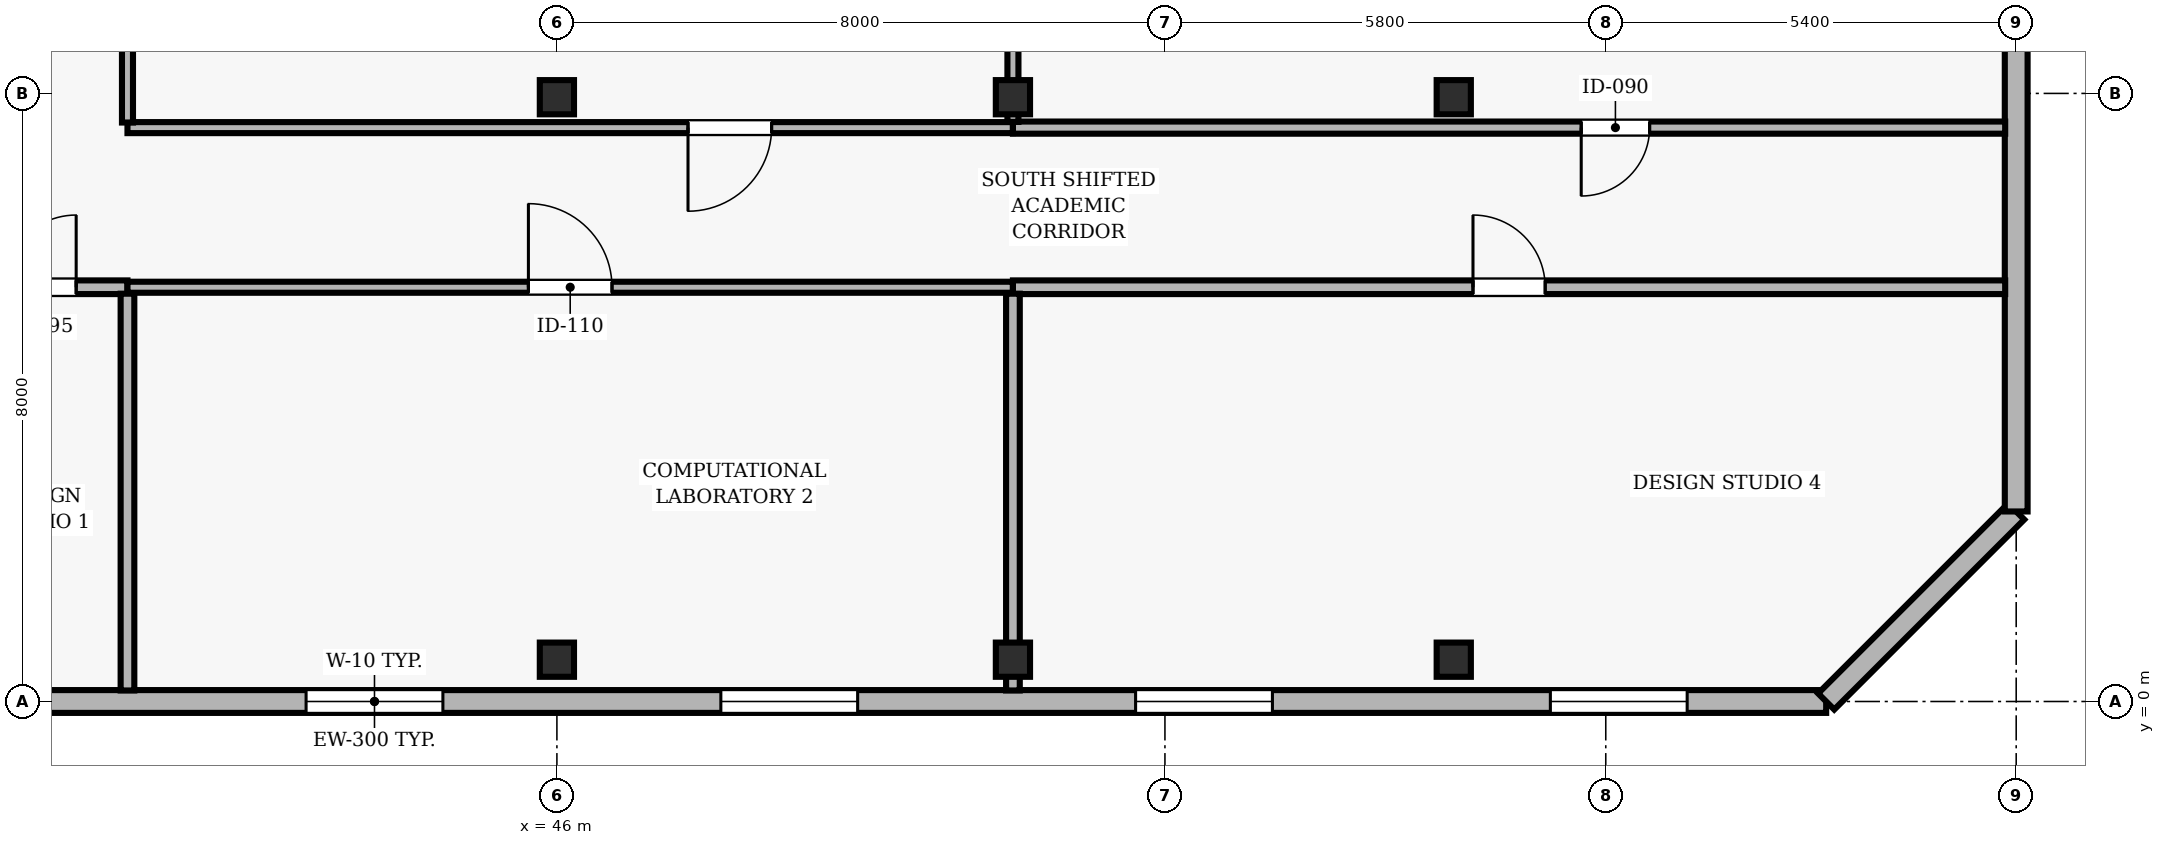
"""IFC4 building model, lengths in metres.
Left out: names, types, materials, properties, quantities, classifications, styles, units other than length and angle.
Written with IfcOpenShell. Run it as: python <this file> out.ifc"""

import sys

from ifc_helpers import new_model, si_unit, direction, frame, frame_2d, origin, origin_2d, place, context, subcontext, project, spatial, rectangle, hollow_rectangle, extrude, element, fill, save


model = new_model("IFC4")
c1 = context("Model", 3, precision=1e-05, world=origin(), true_north=direction((0.0, 1.0)))
c2 = subcontext(c1, "Body", "Model", "MODEL_VIEW")
j1 = project(units=[si_unit("LENGTHUNIT", "METRE"), si_unit("PLANEANGLEUNIT", "RADIAN")], contexts=[c1])
p1 = place(None, origin())
s1 = spatial("IfcSite", under=j1, at=p1, CompositionType="ELEMENT")
p2 = place(p1, origin())
s2 = spatial("IfcBuilding", under=s1, at=p2, CompositionType="ELEMENT")
p3 = place(p2, frame((0.0, 0.0, 187.5)))
s3 = spatial("IfcBuildingStorey", under=s2, at=p3, CompositionType="ELEMENT", Elevation=187.5)
for number, where, z_axis, x_axis in (
    (1, (46.0, 0.55, 0.0), (0.0, 0.0, 1.0), (1.0, 0.0, 0.0)),
    (2, (46.0, 7.95, 0.0), (0.0, 0.0, 1.0), (1.0, 0.0, 0.0)),
    (3, (52.0, 0.55, 0.0), (0.0, 0.0, 1.0), (1.0, 0.0, 0.0)),
    (4, (52.0, 7.95, 0.0), (0.0, 0.0, 1.0), (1.0, 0.0, 0.0)),
    (5, (57.8, 0.55, 0.0), (0.0, 0.0, 1.0), (1.0, 0.0, 0.0)),
    (6, (57.8, 7.95, 0.0), (0.0, 0.0, 1.0), (1.0, 0.0, 0.0)),
):
    element("IfcColumn", number, at=place(p3, frame(where, z_axis=z_axis, x_axis=x_axis)), inside=s3, PredefinedType="COLUMN", context=c2, shape_type="SweptSolid", body=[
        extrude(hollow_rectangle(XDim=0.45, YDim=0.45, WallThickness=0.02, at=origin_2d()), origin(), (0.0, 0.0, 1.0), 3.9),
    ])
p4 = place(p3, frame((24.5, 0.0, 0.0), z_axis=(0.0, 0.0, 1.0), x_axis=(1.0, 0.0, 0.0)))
e7 = element("IfcWall", 7, at=p4, inside=s3, PredefinedType="SOLIDWALL", context=c2, shape_type="SweptSolid", body=[
    extrude(rectangle(XDim=38.2, YDim=0.3, at=frame_2d((19.1, 0.0))), origin(), (0.0, 0.0, 1.0), 3.69),
])
p5 = place(p4, frame((1.829, 0.0, 0.9)))
e8 = element("IfcOpeningElement", 8, at=p5, cuts=e7, PredefinedType="OPENING", context=c2, shape_type="SweptSolid", body=[
    extrude(rectangle(XDim=1.8, YDim=2.2, at=frame_2d((0.9, 1.1))), frame((0.0, 0.16, 0.0), z_axis=(0.0, -1.0, 0.0), x_axis=(1.0, 0.0, 0.0)), (0.0, 0.0, 1.0), 0.32),
])
p6 = place(p4, frame((8.186, 0.0, 0.9)))
e9 = element("IfcOpeningElement", 9, at=p6, cuts=e7, PredefinedType="OPENING", context=c2, shape_type="SweptSolid", body=[
    extrude(rectangle(XDim=1.8, YDim=2.2, at=frame_2d((0.9, 1.1))), frame((0.0, 0.16, 0.0), z_axis=(0.0, -1.0, 0.0), x_axis=(1.0, 0.0, 0.0)), (0.0, 0.0, 1.0), 0.32),
])
p7 = place(p4, frame((18.2, 0.0, 0.9)))
e10 = element("IfcOpeningElement", 10, at=p7, cuts=e7, PredefinedType="OPENING", context=c2, shape_type="SweptSolid", body=[
    extrude(rectangle(XDim=1.8, YDim=2.2, at=frame_2d((0.9, 1.1))), frame((0.0, 0.16, 0.0), z_axis=(0.0, -1.0, 0.0), x_axis=(1.0, 0.0, 0.0)), (0.0, 0.0, 1.0), 0.32),
])
p8 = place(p4, frame((23.657, 0.0, 0.9)))
e11 = element("IfcOpeningElement", 11, at=p8, cuts=e7, PredefinedType="OPENING", context=c2, shape_type="SweptSolid", body=[
    extrude(rectangle(XDim=1.8, YDim=2.2, at=frame_2d((0.9, 1.1))), frame((0.0, 0.16, 0.0), z_axis=(0.0, -1.0, 0.0), x_axis=(1.0, 0.0, 0.0)), (0.0, 0.0, 1.0), 0.32),
])
p9 = place(p4, frame((29.114, 0.0, 0.9)))
e12 = element("IfcOpeningElement", 12, at=p9, cuts=e7, PredefinedType="OPENING", context=c2, shape_type="SweptSolid", body=[
    extrude(rectangle(XDim=1.8, YDim=2.2, at=frame_2d((0.9, 1.1))), frame((0.0, 0.16, 0.0), z_axis=(0.0, -1.0, 0.0), x_axis=(1.0, 0.0, 0.0)), (0.0, 0.0, 1.0), 0.32),
])
p10 = place(p4, frame((34.571, 0.0, 0.9)))
e13 = element("IfcOpeningElement", 13, at=p10, cuts=e7, PredefinedType="OPENING", context=c2, shape_type="SweptSolid", body=[
    extrude(rectangle(XDim=1.8, YDim=2.2, at=frame_2d((0.9, 1.1))), frame((0.0, 0.16, 0.0), z_axis=(0.0, -1.0, 0.0), x_axis=(1.0, 0.0, 0.0)), (0.0, 0.0, 1.0), 0.32),
])
p11 = place(p3, frame((62.7, 0.0, 0.0), z_axis=(0.0, 0.0, 1.0), x_axis=(0.707106781187, 0.707106781187, 0.0)))
e14 = element("IfcWall", 14, at=p11, inside=s3, PredefinedType="SOLIDWALL", context=c2, shape_type="SweptSolid", body=[
    extrude(rectangle(XDim=3.536, YDim=0.3, at=frame_2d((1.768, 0.0))), origin(), (0.0, 0.0, 1.0), 3.69),
])
p12 = place(p3, frame((65.2, 2.5, 0.0), z_axis=(0.0, 0.0, 1.0), x_axis=(0.0, 1.0, 0.0)))
e15 = element("IfcWall", 15, at=p12, inside=s3, PredefinedType="SOLIDWALL", context=c2, shape_type="SweptSolid", body=[
    extrude(rectangle(XDim=11.0, YDim=0.3, at=frame_2d((5.5, 0.0))), origin(), (0.0, 0.0, 1.0), 3.69),
])
p13 = place(p12, frame((6.75, 0.0, 0.9)))
e16 = element("IfcOpeningElement", 16, at=p13, cuts=e15, PredefinedType="OPENING", context=c2, shape_type="SweptSolid", body=[
    extrude(rectangle(XDim=3.0, YDim=2.2, at=frame_2d((1.5, 1.1))), frame((0.0, 0.16, 0.0), z_axis=(0.0, -1.0, 0.0), x_axis=(1.0, 0.0, 0.0)), (0.0, 0.0, 1.0), 0.32),
])
p14 = place(p3, frame((38.05, 5.45, 0.0), z_axis=(0.0, 0.0, 1.0), x_axis=(1.0, 0.0, 0.0)))
e17 = element("IfcWall", 17, at=p14, inside=s3, PredefinedType="PARTITIONING", context=c2, shape_type="SweptSolid", body=[
    extrude(rectangle(XDim=2.3, YDim=0.18, at=frame_2d((1.15, 0.0))), origin(), (0.0, 0.0, 1.0), 3.372),
])
p15 = place(p14, frame((0.675, 0.0, 0.0)))
e18 = element("IfcOpeningElement", 18, at=p15, cuts=e17, PredefinedType="OPENING", context=c2, shape_type="SweptSolid", body=[
    extrude(rectangle(XDim=0.95, YDim=2.1, at=frame_2d((0.475, 1.05))), frame((0.0, 0.1, 0.0), z_axis=(0.0, -1.0, 0.0), x_axis=(1.0, 0.0, 0.0)), (0.0, 0.0, 1.0), 0.2),
])
p16 = place(p3, frame((40.35, 5.45, 0.0), z_axis=(0.0, 0.0, 1.0), x_axis=(1.0, 0.0, 0.0)))
e19 = element("IfcWall", 19, at=p16, inside=s3, PredefinedType="PARTITIONING", context=c2, shape_type="SweptSolid", body=[
    extrude(rectangle(XDim=11.65, YDim=0.145, at=frame_2d((5.825, 0.0))), origin(), (0.0, 0.0, 1.0), 3.372),
])
p17 = place(p16, frame((5.275, 0.0, 0.0)))
e20 = element("IfcOpeningElement", 20, at=p17, cuts=e19, PredefinedType="OPENING", context=c2, shape_type="SweptSolid", body=[
    extrude(rectangle(XDim=1.1, YDim=2.15, at=frame_2d((0.55, 1.075))), frame((0.0, 0.083, 0.0), z_axis=(0.0, -1.0, 0.0), x_axis=(1.0, 0.0, 0.0)), (0.0, 0.0, 1.0), 0.165),
])
p18 = place(p3, frame((52.0, 5.45, 0.0), z_axis=(0.0, 0.0, 1.0), x_axis=(1.0, 0.0, 0.0)))
e21 = element("IfcWall", 21, at=p18, inside=s3, PredefinedType="PARTITIONING", context=c2, shape_type="SweptSolid", body=[
    extrude(rectangle(XDim=13.055, YDim=0.18, at=frame_2d((6.527, 0.0))), origin(), (0.0, 0.0, 1.0), 3.372),
])
p19 = place(p18, frame((6.053, 0.0, 0.0)))
e22 = element("IfcOpeningElement", 22, at=p19, cuts=e21, PredefinedType="OPENING", context=c2, shape_type="SweptSolid", body=[
    extrude(rectangle(XDim=0.95, YDim=2.1, at=frame_2d((0.475, 1.05))), frame((0.0, 0.1, 0.0), z_axis=(0.0, -1.0, 0.0), x_axis=(1.0, 0.0, 0.0)), (0.0, 0.0, 1.0), 0.2),
])
p20 = place(p3, frame((52.0, 7.55, 0.0), z_axis=(0.0, 0.0, 1.0), x_axis=(-1.0, 0.0, 0.0)))
e23 = element("IfcWall", 23, at=p20, inside=s3, PredefinedType="PARTITIONING", context=c2, shape_type="SweptSolid", body=[
    extrude(rectangle(XDim=11.65, YDim=0.145, at=frame_2d((5.825, 0.0))), origin(), (0.0, 0.0, 1.0), 3.146),
])
p21 = place(p20, frame((3.175, 0.0, 0.0)))
e24 = element("IfcOpeningElement", 24, at=p21, cuts=e23, PredefinedType="OPENING", context=c2, shape_type="SweptSolid", body=[
    extrude(rectangle(XDim=1.1, YDim=2.15, at=frame_2d((0.55, 1.075))), frame((0.0, 0.083, 0.0), z_axis=(0.0, -1.0, 0.0), x_axis=(1.0, 0.0, 0.0)), (0.0, 0.0, 1.0), 0.165),
])
p22 = place(p3, frame((65.055, 7.55, 0.0), z_axis=(0.0, 0.0, 1.0), x_axis=(-1.0, 0.0, 0.0)))
e25 = element("IfcWall", 25, at=p22, inside=s3, PredefinedType="PARTITIONING", context=c2, shape_type="SweptSolid", body=[
    extrude(rectangle(XDim=13.055, YDim=0.16, at=frame_2d((6.527, 0.0))), origin(), (0.0, 0.0, 1.0), 3.146),
])
p23 = place(p22, frame((4.678, 0.0, 0.0)))
e26 = element("IfcOpeningElement", 26, at=p23, cuts=e25, PredefinedType="OPENING", context=c2, shape_type="SweptSolid", body=[
    extrude(rectangle(XDim=0.9, YDim=2.1, at=frame_2d((0.45, 1.05))), frame((0.0, 0.09, 0.0), z_axis=(0.0, -1.0, 0.0), x_axis=(1.0, 0.0, 0.0)), (0.0, 0.0, 1.0), 0.18),
])
p24 = place(p3, frame((40.35, 0.145, 0.0), z_axis=(0.0, 0.0, 1.0), x_axis=(0.0, 1.0, 0.0)))
e27 = element("IfcWall", 27, at=p24, inside=s3, PredefinedType="PARTITIONING", context=c2, shape_type="SweptSolid", body=[
    extrude(rectangle(XDim=5.22, YDim=0.18, at=frame_2d((2.61, 0.0))), origin(), (0.0, 0.0, 1.0), 3.69),
])
p25 = place(p3, frame((40.35, 7.617, 0.0), z_axis=(0.0, 0.0, 1.0), x_axis=(0.0, 1.0, 0.0)))
e28 = element("IfcWall", 28, at=p25, inside=s3, PredefinedType="PARTITIONING", context=c2, shape_type="SweptSolid", body=[
    extrude(rectangle(XDim=8.308, YDim=0.145, at=frame_2d((4.154, 0.0))), origin(), (0.0, 0.0, 1.0), 3.372),
])
p26 = place(p3, frame((52.0, 0.145, 0.0), z_axis=(0.0, 0.0, 1.0), x_axis=(0.0, 1.0, 0.0)))
e29 = element("IfcWall", 29, at=p26, inside=s3, PredefinedType="PARTITIONING", context=c2, shape_type="SweptSolid", body=[
    extrude(rectangle(XDim=5.22, YDim=0.18, at=frame_2d((2.61, 0.0))), origin(), (0.0, 0.0, 1.0), 3.146),
])
p27 = place(p3, frame((52.0, 7.625, 0.0), z_axis=(0.0, 0.0, 1.0), x_axis=(0.0, 1.0, 0.0)))
e30 = element("IfcWall", 30, at=p27, inside=s3, PredefinedType="PARTITIONING", context=c2, shape_type="SweptSolid", body=[
    extrude(rectangle(XDim=8.23, YDim=0.145, at=frame_2d((4.115, 0.0))), origin(), (0.0, 0.0, 1.0), 3.146),
])
p28 = place(p7, origin())
e31 = element("IfcWindow", 31, at=p28, inside=s3, PartitioningType="SINGLE_PANEL", PredefinedType="WINDOW", context=c2, shape_type="SweptSolid", body=[
    extrude(rectangle(XDim=1.8, YDim=2.2, at=frame_2d((0.9, 1.1))), frame((0.0, 0.03, 0.0), z_axis=(0.0, -1.0, 0.0), x_axis=(1.0, 0.0, 0.0)), (0.0, 0.0, 1.0), 0.06),
])
fill(e10, e31)
p29 = place(p8, origin())
e32 = element("IfcWindow", 32, at=p29, inside=s3, PartitioningType="SINGLE_PANEL", PredefinedType="WINDOW", context=c2, shape_type="SweptSolid", body=[
    extrude(rectangle(XDim=1.8, YDim=2.2, at=frame_2d((0.9, 1.1))), frame((0.0, 0.03, 0.0), z_axis=(0.0, -1.0, 0.0), x_axis=(1.0, 0.0, 0.0)), (0.0, 0.0, 1.0), 0.06),
])
fill(e11, e32)
p30 = place(p9, origin())
e33 = element("IfcWindow", 33, at=p30, inside=s3, PartitioningType="SINGLE_PANEL", PredefinedType="WINDOW", context=c2, shape_type="SweptSolid", body=[
    extrude(rectangle(XDim=1.8, YDim=2.2, at=frame_2d((0.9, 1.1))), frame((0.0, 0.03, 0.0), z_axis=(0.0, -1.0, 0.0), x_axis=(1.0, 0.0, 0.0)), (0.0, 0.0, 1.0), 0.06),
])
fill(e12, e33)
p31 = place(p10, origin())
e34 = element("IfcWindow", 34, at=p31, inside=s3, PartitioningType="SINGLE_PANEL", PredefinedType="WINDOW", context=c2, shape_type="SweptSolid", body=[
    extrude(rectangle(XDim=1.8, YDim=2.2, at=frame_2d((0.9, 1.1))), frame((0.0, 0.03, 0.0), z_axis=(0.0, -1.0, 0.0), x_axis=(1.0, 0.0, 0.0)), (0.0, 0.0, 1.0), 0.06),
])
fill(e13, e34)
p32 = place(p15, origin())
e35 = element("IfcDoor", 35, at=p32, inside=s3, OperationType="SINGLE_SWING_RIGHT", PredefinedType="DOOR", context=c2, shape_type="SweptSolid", body=[
    extrude(rectangle(XDim=0.95, YDim=2.1, at=frame_2d((0.475, 1.05))), frame((0.0, 0.025, 0.0), z_axis=(0.0, -1.0, 0.0), x_axis=(1.0, 0.0, 0.0)), (0.0, 0.0, 1.0), 0.05),
])
fill(e18, e35)
p33 = place(p17, origin())
e36 = element("IfcDoor", 36, at=p33, inside=s3, OperationType="SINGLE_SWING_LEFT", PredefinedType="DOOR", context=c2, shape_type="SweptSolid", body=[
    extrude(rectangle(XDim=1.1, YDim=2.15, at=frame_2d((0.55, 1.075))), frame((0.0, 0.025, 0.0), z_axis=(0.0, -1.0, 0.0), x_axis=(1.0, 0.0, 0.0)), (0.0, 0.0, 1.0), 0.05),
])
fill(e20, e36)
p34 = place(p21, origin())
e37 = element("IfcDoor", 37, at=p34, inside=s3, OperationType="SINGLE_SWING_RIGHT", PredefinedType="DOOR", context=c2, shape_type="SweptSolid", body=[
    extrude(rectangle(XDim=1.1, YDim=2.15, at=frame_2d((0.55, 1.075))), frame((0.0, 0.025, 0.0), z_axis=(0.0, -1.0, 0.0), x_axis=(1.0, 0.0, 0.0)), (0.0, 0.0, 1.0), 0.05),
])
fill(e24, e37)
p35 = place(p19, origin())
e38 = element("IfcDoor", 38, at=p35, inside=s3, OperationType="SINGLE_SWING_LEFT", PredefinedType="DOOR", context=c2, shape_type="SweptSolid", body=[
    extrude(rectangle(XDim=0.95, YDim=2.1, at=frame_2d((0.475, 1.05))), frame((0.0, 0.025, 0.0), z_axis=(0.0, -1.0, 0.0), x_axis=(1.0, 0.0, 0.0)), (0.0, 0.0, 1.0), 0.05),
])
fill(e22, e38)
p36 = place(p23, origin())
e39 = element("IfcDoor", 39, at=p36, inside=s3, OperationType="SINGLE_SWING_RIGHT", PredefinedType="DOOR", context=c2, shape_type="SweptSolid", body=[
    extrude(rectangle(XDim=0.9, YDim=2.1, at=frame_2d((0.45, 1.05))), frame((0.0, 0.025, 0.0), z_axis=(0.0, -1.0, 0.0), x_axis=(1.0, 0.0, 0.0)), (0.0, 0.0, 1.0), 0.05),
])
fill(e26, e39)
save(model, sys.argv[1])
